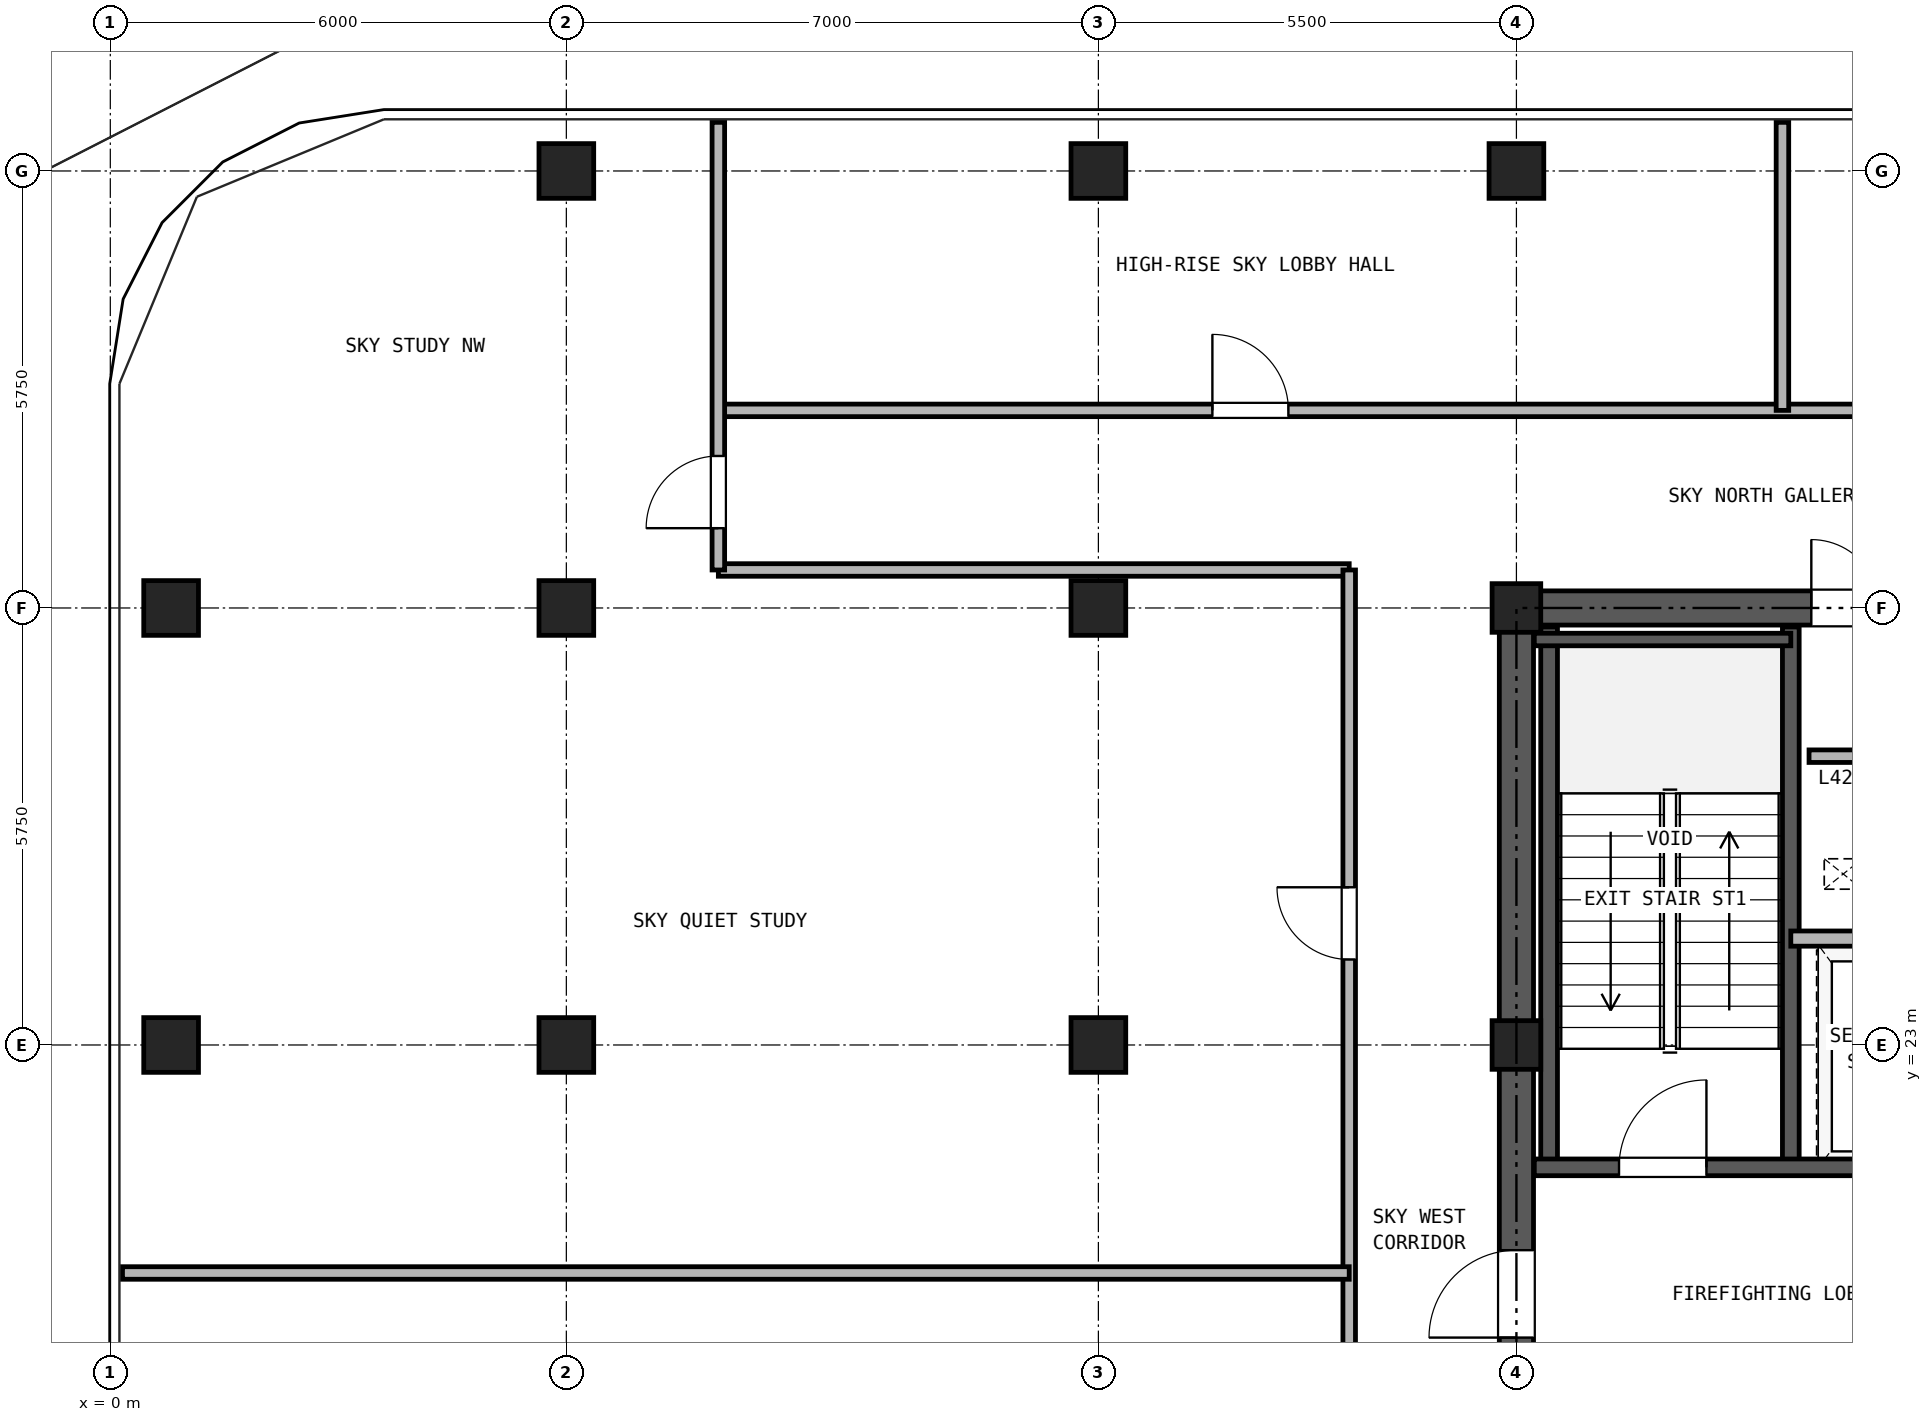
"""IFC4 building model, lengths in metres.
Left out: names, types, materials, properties, quantities, classifications, styles, units other than length and angle.
Written with IfcOpenShell. Run it as: python <this file> out.ifc"""

import sys

from ifc_helpers import new_model, si_unit, direction, frame, frame_2d, origin, origin_2d, place, context, subcontext, project, spatial, rectangle, hollow_rectangle, extrude, source, transform, mapped, element, fill, save


model = new_model("IFC4")
c1 = context("Model", 3, precision=1e-05, world=origin(), true_north=direction((0.0, 1.0)))
c2 = subcontext(c1, "Body", "Model", "MODEL_VIEW")
j1 = project(units=[si_unit("LENGTHUNIT", "METRE"), si_unit("PLANEANGLEUNIT", "RADIAN")], contexts=[c1])
p1 = place(None, origin())
s1 = spatial("IfcSite", under=j1, at=p1, CompositionType="ELEMENT")
p2 = place(p1, origin())
s2 = spatial("IfcBuilding", under=s1, at=p2, CompositionType="ELEMENT")
p3 = place(p2, frame((0.0, 0.0, 151.6)))
s3 = spatial("IfcBuildingStorey", under=s2, at=p3, CompositionType="ELEMENT", Elevation=151.6)
m1 = source(origin(), c2, "Body", "SweptSolid", [
    extrude(hollow_rectangle(XDim=0.72, YDim=0.72, WallThickness=0.04, at=origin_2d()), origin(), (0.0, 0.0, 1.0), 4.25),
])
for number, where, z_axis, x_axis in (
    (1, (6.0, 34.5, 0.0), (0.0, 0.0, 1.0), (1.0, 0.0, 0.0)),
    (2, (13.0, 34.5, 0.0), (0.0, 0.0, 1.0), (1.0, 0.0, 0.0)),
    (3, (18.5, 34.5, 0.0), (0.0, 0.0, 1.0), (1.0, 0.0, 0.0)),
    (4, (0.8, 23.0, 0.0), (0.0, 0.0, 1.0), (1.0, 0.0, 0.0)),
    (5, (0.8, 28.75, 0.0), (0.0, 0.0, 1.0), (1.0, 0.0, 0.0)),
    (6, (6.0, 23.0, 0.0), (0.0, 0.0, 1.0), (1.0, 0.0, 0.0)),
    (7, (6.0, 28.75, 0.0), (0.0, 0.0, 1.0), (1.0, 0.0, 0.0)),
    (8, (13.0, 23.0, 0.0), (0.0, 0.0, 1.0), (1.0, 0.0, 0.0)),
    (9, (13.0, 28.75, 0.0), (0.0, 0.0, 1.0), (1.0, 0.0, 0.0)),
):
    element("IfcColumn", number, at=place(p3, frame(where, z_axis=z_axis, x_axis=x_axis)), inside=s3, PredefinedType="COLUMN", context=c2, shape_type="MappedRepresentation", body=[
        mapped(m1, transform((0.0, 0.0, 0.0), x_axis=(1.0, 0.0, 0.0), y_axis=(0.0, 1.0, 0.0), z_axis=(0.0, 0.0, 1.0), scale=1.0)),
    ])
m2 = source(origin(), c2, "Body", "SweptSolid", [
    extrude(hollow_rectangle(XDim=0.64, YDim=0.64, WallThickness=0.035, at=origin_2d()), origin(), (0.0, 0.0, 1.0), 4.25),
])
for number, where, z_axis, x_axis in (
    (10, (18.5, 23.0, 0.0), (0.0, 0.0, 1.0), (1.0, 0.0, 0.0)),
    (11, (18.5, 28.75, 0.0), (0.0, 0.0, 1.0), (1.0, 0.0, 0.0)),
):
    element("IfcColumn", number, at=place(p3, frame(where, z_axis=z_axis, x_axis=x_axis)), inside=s3, PredefinedType="COLUMN", context=c2, shape_type="MappedRepresentation", body=[
        mapped(m2, transform((0.0, 0.0, 0.0), x_axis=(1.0, 0.0, 0.0), y_axis=(0.0, 1.0, 0.0), z_axis=(0.0, 0.0, 1.0), scale=1.0)),
    ])
p4 = place(p3, frame((18.275, 28.75, 0.0), z_axis=(0.0, 0.0, 1.0), x_axis=(1.0, 0.0, 0.0)))
e12 = element("IfcWall", 12, at=p4, inside=s3, PredefinedType="SHEAR", context=c2, shape_type="SweptSolid", body=[
    extrude(rectangle(XDim=10.45, YDim=0.45, at=frame_2d((5.225, 0.0))), origin(), (0.0, 0.0, 1.0), 4.25),
])
p5 = place(p4, frame((4.105, 0.0, 0.0)))
e13 = element("IfcOpeningElement", 13, at=p5, cuts=e12, PredefinedType="OPENING", context=c2, shape_type="SweptSolid", body=[
    extrude(rectangle(XDim=0.9, YDim=2.05, at=frame_2d((0.45, 1.025))), frame((0.0, 0.235, 0.0), z_axis=(0.0, -1.0, 0.0), x_axis=(1.0, 0.0, 0.0)), (0.0, 0.0, 1.0), 0.47),
])
p6 = place(p4, frame((5.645, 0.0, 0.0)))
e14 = element("IfcOpeningElement", 14, at=p6, cuts=e12, PredefinedType="OPENING", context=c2, shape_type="SweptSolid", body=[
    extrude(rectangle(XDim=0.9, YDim=2.05, at=frame_2d((0.45, 1.025))), frame((0.0, 0.235, 0.0), z_axis=(0.0, -1.0, 0.0), x_axis=(1.0, 0.0, 0.0)), (0.0, 0.0, 1.0), 0.47),
])
p7 = place(p3, frame((18.5, 11.725, 0.0), z_axis=(0.0, 0.0, 1.0), x_axis=(0.0, 1.0, 0.0)))
e15 = element("IfcWall", 15, at=p7, inside=s3, PredefinedType="SHEAR", context=c2, shape_type="SweptSolid", body=[
    extrude(rectangle(XDim=16.8, YDim=0.45, at=frame_2d((8.4, 0.0))), origin(), (0.0, 0.0, 1.0), 4.25),
])
p8 = place(p7, frame((7.425, 0.0, 0.0)))
e16 = element("IfcOpeningElement", 16, at=p8, cuts=e15, PredefinedType="OPENING", context=c2, shape_type="SweptSolid", body=[
    extrude(rectangle(XDim=1.15, YDim=2.2, at=frame_2d((0.575, 1.1))), frame((0.0, 0.235, 0.0), z_axis=(0.0, -1.0, 0.0), x_axis=(1.0, 0.0, 0.0)), (0.0, 0.0, 1.0), 0.47),
])
for number, where, z_axis, x_axis in (
    (17, (18.93, 21.39, 0.0), (0.0, 0.0, 1.0), (0.0, 1.0, 0.0)),
    (18, (22.11, 21.39, 0.0), (0.0, 0.0, 1.0), (0.0, 1.0, 0.0)),
):
    element("IfcWall", number, at=place(p3, frame(where, z_axis=z_axis, x_axis=x_axis)), inside=s3, PredefinedType="SOLIDWALL", context=c2, shape_type="SweptSolid", body=[
        extrude(rectangle(XDim=7.11, YDim=0.22, at=frame_2d((3.555, 0.0))), origin(), (0.0, 0.0, 1.0), 4.25),
    ])
p9 = place(p3, frame((18.735, 28.335, 0.0), z_axis=(0.0, 0.0, 1.0), x_axis=(1.0, 0.0, 0.0)))
e19 = element("IfcWall", 19, at=p9, inside=s3, PredefinedType="PARTITIONING", context=c2, shape_type="SweptSolid", body=[
    extrude(rectangle(XDim=3.375, YDim=0.165, at=frame_2d((1.688, 0.0))), origin(), (0.0, 0.0, 1.0), 4.25),
])
p10 = place(p3, frame((18.735, 21.39, 0.0), z_axis=(0.0, 0.0, 1.0), x_axis=(1.0, 0.0, 0.0)))
e20 = element("IfcWall", 20, at=p10, inside=s3, PredefinedType="SOLIDWALL", context=c2, shape_type="SweptSolid", body=[
    extrude(rectangle(XDim=6.395, YDim=0.22, at=frame_2d((3.197, 0.0))), origin(), (0.0, 0.0, 1.0), 4.25),
])
p11 = place(p10, frame((1.115, 0.0, 0.0)))
e21 = element("IfcOpeningElement", 21, at=p11, cuts=e20, PredefinedType="OPENING", context=c2, shape_type="SweptSolid", body=[
    extrude(rectangle(XDim=1.15, YDim=2.2, at=frame_2d((0.575, 1.1))), frame((0.0, 0.12, 0.0), z_axis=(0.0, -1.0, 0.0), x_axis=(1.0, 0.0, 0.0)), (0.0, 0.0, 1.0), 0.24),
])
p12 = place(p10, frame((4.845, 0.0, 0.0)))
e22 = element("IfcOpeningElement", 22, at=p12, cuts=e20, PredefinedType="OPENING", context=c2, shape_type="SweptSolid", body=[
    extrude(rectangle(XDim=1.1, YDim=2.25, at=frame_2d((0.55, 1.125))), frame((0.0, 0.12, 0.0), z_axis=(0.0, -1.0, 0.0), x_axis=(1.0, 0.0, 0.0)), (0.0, 0.0, 1.0), 0.24),
])
p13 = place(p3, frame((22.11, 24.4, 0.0), z_axis=(0.0, 0.0, 1.0), x_axis=(1.0, 0.0, 0.0)))
e23 = element("IfcWall", 23, at=p13, inside=s3, PredefinedType="PARTITIONING", context=c2, shape_type="SweptSolid", body=[
    extrude(rectangle(XDim=3.02, YDim=0.2, at=frame_2d((1.51, 0.0))), origin(), (0.0, 0.0, 1.0), 4.25),
])
p14 = place(p3, frame((8.0, 31.35, 0.0), z_axis=(0.0, 0.0, 1.0), x_axis=(1.0, 0.0, 0.0)))
e24 = element("IfcWall", 24, at=p14, inside=s3, PredefinedType="PARTITIONING", context=c2, shape_type="SweptSolid", body=[
    extrude(rectangle(XDim=27.64, YDim=0.165, at=frame_2d((13.82, 0.0))), origin(), (0.0, 0.0, 1.0), 4.25),
])
p15 = place(p14, frame((6.5, 0.0, 0.0)))
e25 = element("IfcOpeningElement", 25, at=p15, cuts=e24, PredefinedType="OPENING", context=c2, shape_type="SweptSolid", body=[
    extrude(rectangle(XDim=1.0, YDim=2.15, at=frame_2d((0.5, 1.075))), frame((0.0, 0.093, 0.0), z_axis=(0.0, -1.0, 0.0), x_axis=(1.0, 0.0, 0.0)), (0.0, 0.0, 1.0), 0.185),
])
p16 = place(p14, frame((20.32, 0.0, 0.0)))
e26 = element("IfcOpeningElement", 26, at=p16, cuts=e24, PredefinedType="OPENING", context=c2, shape_type="SweptSolid", body=[
    extrude(rectangle(XDim=0.95, YDim=2.15, at=frame_2d((0.475, 1.075))), frame((0.0, 0.093, 0.0), z_axis=(0.0, -1.0, 0.0), x_axis=(1.0, 0.0, 0.0)), (0.0, 0.0, 1.0), 0.185),
])
p17 = place(p3, frame((8.0, 29.25, 0.0), z_axis=(0.0, 0.0, 1.0), x_axis=(1.0, 0.0, 0.0)))
e27 = element("IfcWall", 27, at=p17, inside=s3, PredefinedType="PARTITIONING", context=c2, shape_type="SweptSolid", body=[
    extrude(rectangle(XDim=8.3, YDim=0.165, at=frame_2d((4.15, 0.0))), origin(), (0.0, 0.0, 1.0), 4.25),
])
p18 = place(p3, frame((16.3, 10.9, 0.0), z_axis=(0.0, 0.0, 1.0), x_axis=(0.0, 1.0, 0.0)))
e28 = element("IfcWall", 28, at=p18, inside=s3, PredefinedType="PARTITIONING", context=c2, shape_type="SweptSolid", body=[
    extrude(rectangle(XDim=18.35, YDim=0.165, at=frame_2d((9.175, 0.0))), origin(), (0.0, 0.0, 1.0), 4.25),
])
p19 = place(p18, frame((4.05, 0.0, 0.0)))
e29 = element("IfcOpeningElement", 29, at=p19, cuts=e28, PredefinedType="OPENING", context=c2, shape_type="SweptSolid", body=[
    extrude(rectangle(XDim=0.95, YDim=2.15, at=frame_2d((0.475, 1.075))), frame((0.0, 0.093, 0.0), z_axis=(0.0, -1.0, 0.0), x_axis=(1.0, 0.0, 0.0)), (0.0, 0.0, 1.0), 0.185),
])
p20 = place(p18, frame((13.225, 0.0, 0.0)))
e30 = element("IfcOpeningElement", 30, at=p20, cuts=e28, PredefinedType="OPENING", context=c2, shape_type="SweptSolid", body=[
    extrude(rectangle(XDim=0.95, YDim=2.15, at=frame_2d((0.475, 1.075))), frame((0.0, 0.093, 0.0), z_axis=(0.0, -1.0, 0.0), x_axis=(1.0, 0.0, 0.0)), (0.0, 0.0, 1.0), 0.185),
])
p21 = place(p3, frame((8.0, 29.25, 0.0), z_axis=(0.0, 0.0, 1.0), x_axis=(0.0, 1.0, 0.0)))
e31 = element("IfcWall", 31, at=p21, inside=s3, PredefinedType="PARTITIONING", context=c2, shape_type="SweptSolid", body=[
    extrude(rectangle(XDim=5.89, YDim=0.165, at=frame_2d((2.945, 0.0))), origin(), (0.0, 0.0, 1.0), 4.25),
])
p22 = place(p21, frame((0.55, 0.0, 0.0)))
e32 = element("IfcOpeningElement", 32, at=p22, cuts=e31, PredefinedType="OPENING", context=c2, shape_type="SweptSolid", body=[
    extrude(rectangle(XDim=0.95, YDim=2.15, at=frame_2d((0.475, 1.075))), frame((0.0, 0.093, 0.0), z_axis=(0.0, -1.0, 0.0), x_axis=(1.0, 0.0, 0.0)), (0.0, 0.0, 1.0), 0.185),
])
p23 = place(p3, frame((22.0, 31.35, 0.0), z_axis=(0.0, 0.0, 1.0), x_axis=(0.0, 1.0, 0.0)))
e33 = element("IfcWall", 33, at=p23, inside=s3, PredefinedType="PARTITIONING", context=c2, shape_type="SweptSolid", body=[
    extrude(rectangle(XDim=3.79, YDim=0.165, at=frame_2d((1.895, 0.0))), origin(), (0.0, 0.0, 1.0), 4.25),
])
p24 = place(p3, frame((0.16, 20.0, 0.0), z_axis=(0.0, 0.0, 1.0), x_axis=(1.0, 0.0, 0.0)))
e34 = element("IfcWall", 34, at=p24, inside=s3, PredefinedType="PARTITIONING", context=c2, shape_type="SweptSolid", body=[
    extrude(rectangle(XDim=16.14, YDim=0.165, at=frame_2d((8.07, 0.0))), origin(), (0.0, 0.0, 1.0), 3.883),
])
p25 = place(p3, frame((22.35, 26.8, 0.0), z_axis=(0.0, 0.0, 1.0), x_axis=(1.0, 0.0, 0.0)))
e35 = element("IfcWall", 35, at=p25, inside=s3, PredefinedType="PARTITIONING", context=c2, shape_type="SweptSolid", body=[
    extrude(rectangle(XDim=1.1, YDim=0.165, at=frame_2d((0.55, 0.0))), origin(), (0.0, 0.0, 1.0), 4.25),
])
p26 = place(p11, frame((1.15, 0.0, 0.0), z_axis=(0.0, 0.0, 1.0), x_axis=(-1.0, 0.0, 0.0)))
e36 = element("IfcDoor", 36, at=p26, inside=s3, OperationType="SINGLE_SWING_RIGHT", PredefinedType="DOOR", context=c2, shape_type="SweptSolid", body=[
    extrude(rectangle(XDim=1.15, YDim=2.2, at=frame_2d((0.575, 1.1))), frame((0.0, 0.025, 0.0), z_axis=(0.0, -1.0, 0.0), x_axis=(1.0, 0.0, 0.0)), (0.0, 0.0, 1.0), 0.05),
])
fill(e21, e36)
p27 = place(p8, frame((1.15, 0.0, 0.0), z_axis=(0.0, 0.0, 1.0), x_axis=(-1.0, 0.0, 0.0)))
e37 = element("IfcDoor", 37, at=p27, inside=s3, OperationType="SINGLE_SWING_LEFT", PredefinedType="DOOR", context=c2, shape_type="SweptSolid", body=[
    extrude(rectangle(XDim=1.15, YDim=2.2, at=frame_2d((0.575, 1.1))), frame((0.0, 0.025, 0.0), z_axis=(0.0, -1.0, 0.0), x_axis=(1.0, 0.0, 0.0)), (0.0, 0.0, 1.0), 0.05),
])
fill(e16, e37)
p28 = place(p5, origin())
e38 = element("IfcDoor", 38, at=p28, inside=s3, OperationType="SINGLE_SWING_LEFT", PredefinedType="DOOR", context=c2, shape_type="SweptSolid", body=[
    extrude(rectangle(XDim=0.9, YDim=2.05, at=frame_2d((0.45, 1.025))), frame((0.0, 0.025, 0.0), z_axis=(0.0, -1.0, 0.0), x_axis=(1.0, 0.0, 0.0)), (0.0, 0.0, 1.0), 0.05),
])
fill(e13, e38)
p29 = place(p15, origin())
e39 = element("IfcDoor", 39, at=p29, inside=s3, OperationType="SINGLE_SWING_LEFT", PredefinedType="DOOR", context=c2, shape_type="SweptSolid", body=[
    extrude(rectangle(XDim=1.0, YDim=2.15, at=frame_2d((0.5, 1.075))), frame((0.0, 0.025, 0.0), z_axis=(0.0, -1.0, 0.0), x_axis=(1.0, 0.0, 0.0)), (0.0, 0.0, 1.0), 0.05),
])
fill(e25, e39)
p30 = place(p22, frame((0.95, 0.0, 0.0), z_axis=(0.0, 0.0, 1.0), x_axis=(-1.0, 0.0, 0.0)))
e40 = element("IfcDoor", 40, at=p30, inside=s3, OperationType="SINGLE_SWING_LEFT", PredefinedType="DOOR", context=c2, shape_type="SweptSolid", body=[
    extrude(rectangle(XDim=0.95, YDim=2.15, at=frame_2d((0.475, 1.075))), frame((0.0, 0.025, 0.0), z_axis=(0.0, -1.0, 0.0), x_axis=(1.0, 0.0, 0.0)), (0.0, 0.0, 1.0), 0.05),
])
fill(e32, e40)
p31 = place(p20, frame((0.95, 0.0, 0.0), z_axis=(0.0, 0.0, 1.0), x_axis=(-1.0, 0.0, 0.0)))
e41 = element("IfcDoor", 41, at=p31, inside=s3, OperationType="SINGLE_SWING_RIGHT", PredefinedType="DOOR", context=c2, shape_type="SweptSolid", body=[
    extrude(rectangle(XDim=0.95, YDim=2.15, at=frame_2d((0.475, 1.075))), frame((0.0, 0.025, 0.0), z_axis=(0.0, -1.0, 0.0), x_axis=(1.0, 0.0, 0.0)), (0.0, 0.0, 1.0), 0.05),
])
fill(e30, e41)
save(model, sys.argv[1])
